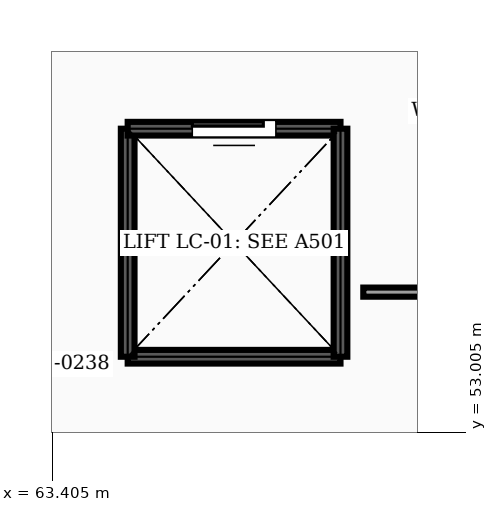
"""IFC4 building model, lengths in metres.
Left out: names, types, materials, properties, quantities, classifications, styles, units other than length and angle.
Written with IfcOpenShell. Run it as: python <this file> out.ifc"""

import sys

from ifc_helpers import new_model, si_unit, direction, frame, frame_2d, origin, place, context, subcontext, project, spatial, rectangle, extrude, element, fill, save


model = new_model("IFC4")
c1 = context("Model", 3, precision=1e-05, world=origin(), true_north=direction((0.0, 1.0)))
c2 = subcontext(c1, "Body", "Model", "MODEL_VIEW")
j1 = project(units=[si_unit("LENGTHUNIT", "METRE"), si_unit("PLANEANGLEUNIT", "RADIAN")], contexts=[c1])
p1 = place(None, origin())
s1 = spatial("IfcSite", under=j1, at=p1, CompositionType="ELEMENT")
p2 = place(p1, origin())
s2 = spatial("IfcBuilding", under=s1, at=p2, CompositionType="ELEMENT")
p3 = place(p2, frame((0.0, 0.0, 8.5)))
s3 = spatial("IfcBuildingStorey", under=s2, at=p3, CompositionType="ELEMENT", Elevation=8.5)
p4 = place(p3, frame((67.2, 54.0, 0.0), z_axis=(0.0, 0.0, 1.0), x_axis=(-1.0, 0.0, 0.0)))
e1 = element("IfcWall", 1, at=p4, inside=s3, PredefinedType="SHEAR", context=c2, shape_type="SweptSolid", body=[
    extrude(rectangle(XDim=2.8, YDim=0.18, at=frame_2d((1.4, 0.0))), origin(), (0.0, 0.0, 1.0), 3.57),
])
p5 = place(p3, frame((64.4, 54.0, 0.0), z_axis=(0.0, 0.0, 1.0), x_axis=(0.0, 1.0, 0.0)))
e2 = element("IfcWall", 2, at=p5, inside=s3, PredefinedType="SHEAR", context=c2, shape_type="SweptSolid", body=[
    extrude(rectangle(XDim=3.0, YDim=0.18, at=frame_2d((1.5, 0.0))), origin(), (0.0, 0.0, 1.0), 3.57),
])
p6 = place(p3, frame((64.4, 57.0, 0.0), z_axis=(0.0, 0.0, 1.0), x_axis=(1.0, 0.0, 0.0)))
e3 = element("IfcWall", 3, at=p6, inside=s3, PredefinedType="SHEAR", context=c2, shape_type="SweptSolid", body=[
    extrude(rectangle(XDim=2.8, YDim=0.18, at=frame_2d((1.4, 0.0))), origin(), (0.0, 0.0, 1.0), 3.57),
])
p7 = place(p6, frame((0.85, 0.0, 0.0)))
e4 = element("IfcOpeningElement", 4, at=p7, cuts=e3, PredefinedType="OPENING", context=c2, shape_type="SweptSolid", body=[
    extrude(rectangle(XDim=1.1, YDim=2.15, at=frame_2d((0.55, 1.075))), frame((0.0, 0.1, 0.0), z_axis=(0.0, -1.0, 0.0), x_axis=(1.0, 0.0, 0.0)), (0.0, 0.0, 1.0), 0.2),
])
p8 = place(p3, frame((67.2, 57.0, 0.0), z_axis=(0.0, 0.0, 1.0), x_axis=(0.0, -1.0, 0.0)))
e5 = element("IfcWall", 5, at=p8, inside=s3, PredefinedType="SHEAR", context=c2, shape_type="SweptSolid", body=[
    extrude(rectangle(XDim=3.0, YDim=0.18, at=frame_2d((1.5, 0.0))), origin(), (0.0, 0.0, 1.0), 3.57),
])
p9 = place(p3, frame((68.74, 54.85, 0.0), z_axis=(0.0, 0.0, 1.0), x_axis=(-1.0, 0.0, 0.0)))
e6 = element("IfcWall", 6, at=p9, inside=s3, PredefinedType="PARTITIONING", context=c2, shape_type="SweptSolid", body=[
    extrude(rectangle(XDim=1.24, YDim=0.12, at=frame_2d((0.62, 0.0))), origin(), (0.0, 0.0, 1.0), 3.57),
])
p10 = place(p3, frame((64.1, 53.9, 0.0), z_axis=(0.0, 0.0, 1.0), x_axis=(-1.0, 0.0, 0.0)))
e7 = element("IfcWall", 7, at=p10, inside=s3, PredefinedType="PARTITIONING", context=c2, shape_type="SweptSolid", body=[
    extrude(rectangle(XDim=1.6, YDim=0.135, at=frame_2d((0.8, 0.0))), origin(), (0.0, 0.0, 1.0), 3.57),
])
p11 = place(p7, origin())
e8 = element("IfcDoor", 8, at=p11, inside=s3, OperationType="SLIDING_TO_LEFT", PredefinedType="DOOR", context=c2, shape_type="SweptSolid", body=[
    extrude(rectangle(XDim=1.1, YDim=2.15, at=frame_2d((0.55, 1.075))), frame((0.0, 0.025, 0.0), z_axis=(0.0, -1.0, 0.0), x_axis=(1.0, 0.0, 0.0)), (0.0, 0.0, 1.0), 0.05),
])
fill(e4, e8)
save(model, sys.argv[1])
